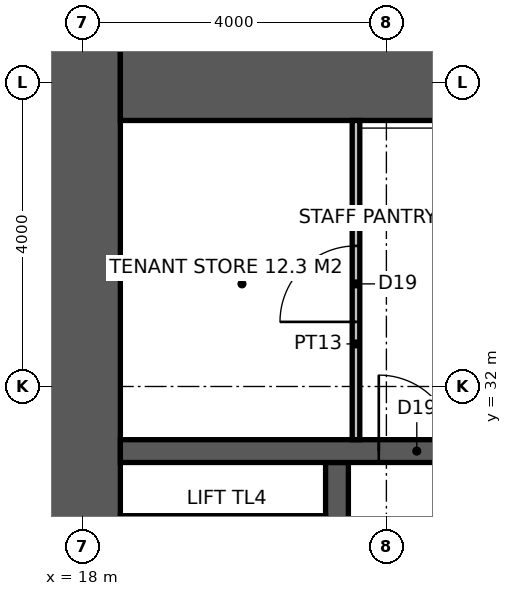
"""IFC4 building model, lengths in metres.
Left out: names, types, materials, properties, quantities, classifications, styles, units other than length and angle.
Written with IfcOpenShell. Run it as: python <this file> out.ifc"""

import sys

from ifc_helpers import new_model, si_unit, direction, frame, frame_2d, origin, place, context, subcontext, project, spatial, rectangle, extrude, element, fill, save


model = new_model("IFC4")
c1 = context("Model", 3, precision=1e-05, world=origin(), true_north=direction((0.0, 1.0)))
c2 = subcontext(c1, "Body", "Model", "MODEL_VIEW")
j1 = project(units=[si_unit("LENGTHUNIT", "METRE"), si_unit("PLANEANGLEUNIT", "RADIAN")], contexts=[c1])
p1 = place(None, origin())
s1 = spatial("IfcSite", under=j1, at=p1, CompositionType="ELEMENT")
p2 = place(p1, origin())
s2 = spatial("IfcBuilding", under=s1, at=p2, CompositionType="ELEMENT")
p3 = place(p2, frame((0.0, 0.0, 242.2)))
s3 = spatial("IfcBuildingStorey", under=s2, at=p3, CompositionType="ELEMENT", Elevation=242.2)
p4 = place(p3, frame((18.0, 17.5, -0.15), z_axis=(0.0, 0.0, 1.0), x_axis=(0.0, 1.0, 0.0)))
e1 = element("IfcWall", 1, at=p4, inside=s3, PredefinedType="SHEAR", context=c2, shape_type="SweptSolid", body=[
    extrude(rectangle(XDim=19.0, YDim=1.0, at=frame_2d((9.5, 0.0))), origin(), (0.0, 0.0, 1.0), 4.0),
])
p5 = place(p3, frame((18.5, 36.0, -0.15), z_axis=(0.0, 0.0, 1.0), x_axis=(1.0, 0.0, 0.0)))
e2 = element("IfcWall", 2, at=p5, inside=s3, PredefinedType="SHEAR", context=c2, shape_type="SweptSolid", body=[
    extrude(rectangle(XDim=17.6, YDim=1.0, at=frame_2d((8.8, 0.0))), origin(), (0.0, 0.0, 1.0), 4.0),
])
p6 = place(p3, frame((21.35, 18.5, -0.15), z_axis=(0.0, 0.0, 1.0), x_axis=(0.0, 1.0, 0.0)))
e3 = element("IfcWall", 3, at=p6, inside=s3, PredefinedType="SHEAR", context=c2, shape_type="SweptSolid", body=[
    extrude(rectangle(XDim=12.5, YDim=0.3, at=frame_2d((6.25, 0.0))), origin(), (0.0, 0.0, 1.0), 4.0),
])
p7 = place(p6, frame((0.875, 0.0, 0.15)))
e4 = element("IfcOpeningElement", 4, at=p7, cuts=e3, PredefinedType="OPENING", context=c2, shape_type="SweptSolid", body=[
    extrude(rectangle(XDim=1.1, YDim=2.2, at=frame_2d((0.55, 1.1))), frame((0.0, 0.16, 0.0), z_axis=(0.0, -1.0, 0.0), x_axis=(1.0, 0.0, 0.0)), (0.0, 0.0, 1.0), 0.32),
])
p8 = place(p6, frame((3.825, 0.0, 0.15)))
e5 = element("IfcOpeningElement", 5, at=p8, cuts=e3, PredefinedType="OPENING", context=c2, shape_type="SweptSolid", body=[
    extrude(rectangle(XDim=1.1, YDim=2.2, at=frame_2d((0.55, 1.1))), frame((0.0, 0.16, 0.0), z_axis=(0.0, -1.0, 0.0), x_axis=(1.0, 0.0, 0.0)), (0.0, 0.0, 1.0), 0.32),
])
p9 = place(p6, frame((6.675, 0.0, 0.15)))
e6 = element("IfcOpeningElement", 6, at=p9, cuts=e3, PredefinedType="OPENING", context=c2, shape_type="SweptSolid", body=[
    extrude(rectangle(XDim=1.1, YDim=2.2, at=frame_2d((0.55, 1.1))), frame((0.0, 0.16, 0.0), z_axis=(0.0, -1.0, 0.0), x_axis=(1.0, 0.0, 0.0)), (0.0, 0.0, 1.0), 0.32),
])
p10 = place(p6, frame((9.575, 0.0, 0.15)))
e7 = element("IfcOpeningElement", 7, at=p10, cuts=e3, PredefinedType="OPENING", context=c2, shape_type="SweptSolid", body=[
    extrude(rectangle(XDim=1.1, YDim=2.2, at=frame_2d((0.55, 1.1))), frame((0.0, 0.16, 0.0), z_axis=(0.0, -1.0, 0.0), x_axis=(1.0, 0.0, 0.0)), (0.0, 0.0, 1.0), 0.32),
])
p11 = place(p3, frame((18.5, 31.15, -0.15), z_axis=(0.0, 0.0, 1.0), x_axis=(1.0, 0.0, 0.0)))
e8 = element("IfcWall", 8, at=p11, inside=s3, PredefinedType="SHEAR", context=c2, shape_type="SweptSolid", body=[
    extrude(rectangle(XDim=5.35, YDim=0.3, at=frame_2d((2.675, 0.0))), origin(), (0.0, 0.0, 1.0), 4.0),
])
p12 = place(p11, frame((3.4, 0.0, 0.15)))
e9 = element("IfcOpeningElement", 9, at=p12, cuts=e8, PredefinedType="OPENING", context=c2, shape_type="SweptSolid", body=[
    extrude(rectangle(XDim=1.0, YDim=2.2, at=frame_2d((0.5, 1.1))), frame((0.0, 0.16, 0.0), z_axis=(0.0, -1.0, 0.0), x_axis=(1.0, 0.0, 0.0)), (0.0, 0.0, 1.0), 0.32),
])
p13 = place(p3, frame((21.6, 31.3, 0.0), z_axis=(0.0, 0.0, 1.0), x_axis=(0.0, 1.0, 0.0)))
e10 = element("IfcWall", 10, at=p13, inside=s3, PredefinedType="PARTITIONING", context=c2, shape_type="SweptSolid", body=[
    extrude(rectangle(XDim=4.2, YDim=0.1, at=frame_2d((2.1, 0.0))), origin(), (0.0, 0.0, 1.0), 3.85),
])
p14 = place(p13, frame((1.55, 0.0, 0.0)))
e11 = element("IfcOpeningElement", 11, at=p14, cuts=e10, PredefinedType="OPENING", context=c2, shape_type="SweptSolid", body=[
    extrude(rectangle(XDim=1.0, YDim=2.2, at=frame_2d((0.5, 1.1))), frame((0.0, 0.06, 0.0), z_axis=(0.0, -1.0, 0.0), x_axis=(1.0, 0.0, 0.0)), (0.0, 0.0, 1.0), 0.12),
])
p15 = place(p12, origin())
e12 = element("IfcDoor", 12, at=p15, inside=s3, OperationType="SINGLE_SWING_LEFT", PredefinedType="DOOR", context=c2, shape_type="SweptSolid", body=[
    extrude(rectangle(XDim=1.0, YDim=2.2, at=frame_2d((0.5, 1.1))), frame((0.0, 0.025, 0.0), z_axis=(0.0, -1.0, 0.0), x_axis=(1.0, 0.0, 0.0)), (0.0, 0.0, 1.0), 0.05),
])
fill(e9, e12)
p16 = place(p14, origin())
e13 = element("IfcDoor", 13, at=p16, inside=s3, OperationType="SINGLE_SWING_LEFT", PredefinedType="DOOR", context=c2, shape_type="SweptSolid", body=[
    extrude(rectangle(XDim=1.0, YDim=2.2, at=frame_2d((0.5, 1.1))), frame((0.0, 0.025, 0.0), z_axis=(0.0, -1.0, 0.0), x_axis=(1.0, 0.0, 0.0)), (0.0, 0.0, 1.0), 0.05),
])
fill(e11, e13)
save(model, sys.argv[1])
